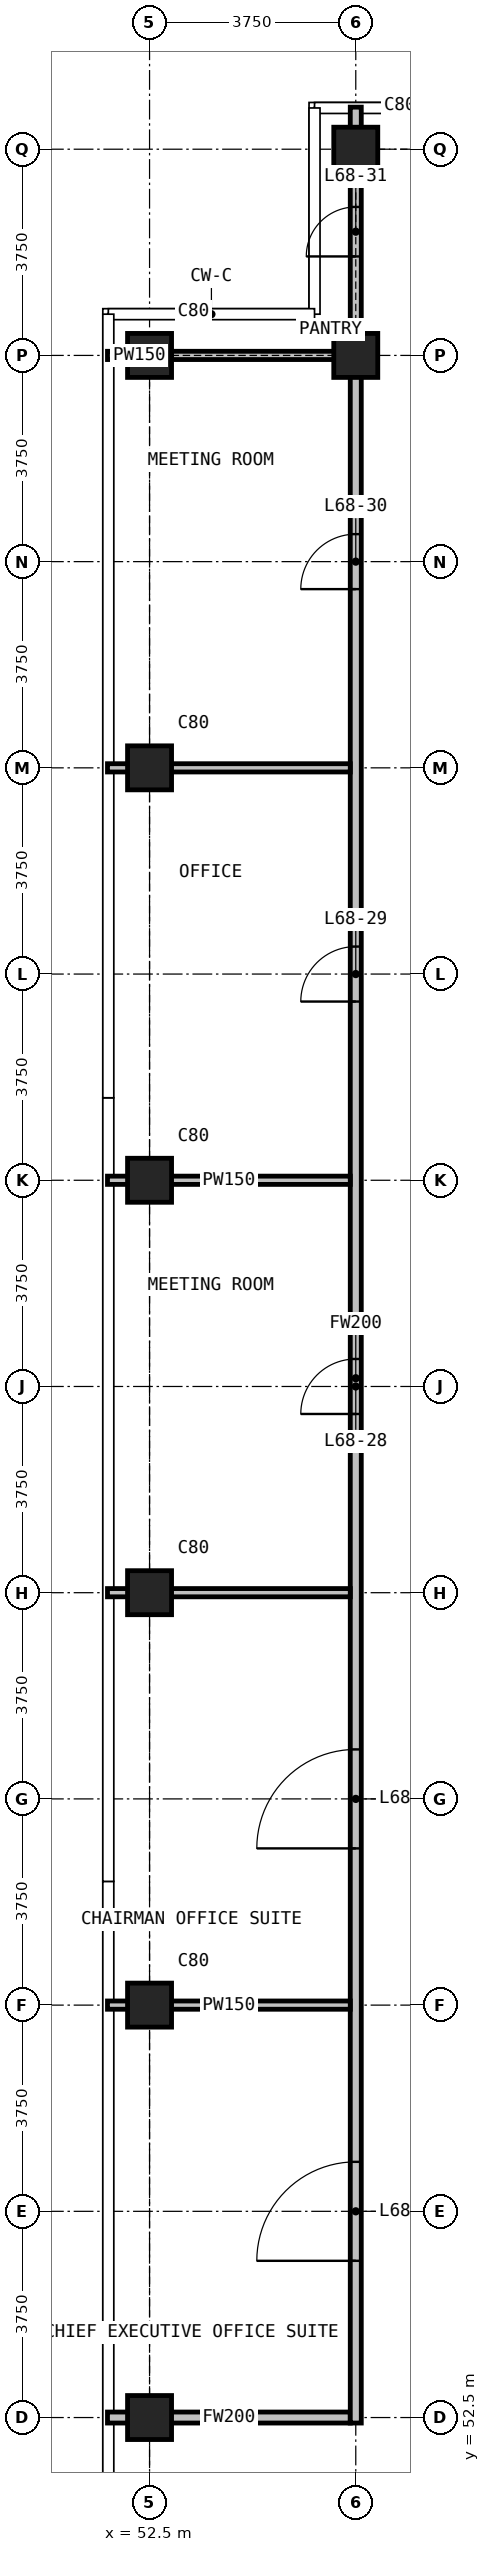
"""IFC4 building model, lengths in metres.
Left out: names, types, materials, properties, quantities, classifications, styles, units other than length and angle.
Written with IfcOpenShell. Run it as: python <this file> out.ifc"""

import sys

from ifc_helpers import new_model, si_unit, direction, frame, frame_2d, origin, origin_2d, place, context, subcontext, project, spatial, rectangle, extrude, element, fill, save


model = new_model("IFC4")
c1 = context("Model", 3, precision=1e-05, world=origin(), true_north=direction((0.0, 1.0)))
c2 = subcontext(c1, "Body", "Model", "MODEL_VIEW")
j1 = project(units=[si_unit("LENGTHUNIT", "METRE"), si_unit("PLANEANGLEUNIT", "RADIAN")], contexts=[c1])
p1 = place(None, origin())
s1 = spatial("IfcSite", under=j1, at=p1, CompositionType="ELEMENT")
p2 = place(p1, origin())
s2 = spatial("IfcBuilding", under=s1, at=p2, CompositionType="ELEMENT")
p3 = place(p2, frame((0.0, 0.0, 262.1)))
s3 = spatial("IfcBuildingStorey", under=s2, at=p3, CompositionType="ELEMENT", Elevation=262.1)
for number, where, z_axis, x_axis in (
    (1, (52.5, 52.5, 0.0), (0.0, 0.0, 1.0), (1.0, 0.0, 0.0)),
    (2, (52.5, 60.0, 0.0), (0.0, 0.0, 1.0), (1.0, 0.0, 0.0)),
    (3, (52.5, 67.5, 0.0), (0.0, 0.0, 1.0), (1.0, 0.0, 0.0)),
    (4, (52.5, 75.0, 0.0), (0.0, 0.0, 1.0), (1.0, 0.0, 0.0)),
    (5, (52.5, 82.5, 0.0), (0.0, 0.0, 1.0), (1.0, 0.0, 0.0)),
    (6, (52.5, 90.0, 0.0), (0.0, 0.0, 1.0), (1.0, 0.0, 0.0)),
    (7, (56.25, 90.0, 0.0), (0.0, 0.0, 1.0), (1.0, 0.0, 0.0)),
    (8, (56.25, 93.75, 0.0), (0.0, 0.0, 1.0), (1.0, 0.0, 0.0)),
):
    element("IfcColumn", number, at=place(p3, frame(where, z_axis=z_axis, x_axis=x_axis)), inside=s3, PredefinedType="COLUMN", context=c2, shape_type="SweptSolid", body=[
        extrude(rectangle(XDim=0.8, YDim=0.8, at=origin_2d()), origin(), (0.0, 0.0, 1.0), 3.6),
    ])
p4 = place(p3, frame((51.735, 52.5, 0.0), z_axis=(0.0, 0.0, 1.0), x_axis=(1.0, 0.0, 0.0)))
e9 = element("IfcWall", 9, at=p4, inside=s3, PredefinedType="PARTITIONING", context=c2, shape_type="SweptSolid", body=[
    extrude(rectangle(XDim=4.415, YDim=0.2, at=frame_2d((2.208, 0.0))), origin(), (0.0, 0.0, 1.0), 3.3),
])
p5 = place(p3, frame((56.25, 52.4, 0.0), z_axis=(0.0, 0.0, 1.0), x_axis=(0.0, 1.0, 0.0)))
e10 = element("IfcWall", 10, at=p5, inside=s3, PredefinedType="PARTITIONING", context=c2, shape_type="SweptSolid", body=[
    extrude(rectangle(XDim=38.0, YDim=0.2, at=frame_2d((19.0, 0.0))), origin(), (0.0, 0.0, 1.0), 3.3),
])
p6 = place(p5, frame((2.95, 0.0, 0.0)))
e11 = element("IfcOpeningElement", 11, at=p6, cuts=e10, PredefinedType="OPENING", context=c2, shape_type="SweptSolid", body=[
    extrude(rectangle(XDim=1.8, YDim=2.2, at=frame_2d((0.9, 1.1))), frame((0.0, 0.11, 0.0), z_axis=(0.0, -1.0, 0.0), x_axis=(1.0, 0.0, 0.0)), (0.0, 0.0, 1.0), 0.22),
])
p7 = place(p5, frame((10.45, 0.0, 0.0)))
e12 = element("IfcOpeningElement", 12, at=p7, cuts=e10, PredefinedType="OPENING", context=c2, shape_type="SweptSolid", body=[
    extrude(rectangle(XDim=1.8, YDim=2.2, at=frame_2d((0.9, 1.1))), frame((0.0, 0.11, 0.0), z_axis=(0.0, -1.0, 0.0), x_axis=(1.0, 0.0, 0.0)), (0.0, 0.0, 1.0), 0.22),
])
p8 = place(p5, frame((18.35, 0.0, 0.0)))
e13 = element("IfcOpeningElement", 13, at=p8, cuts=e10, PredefinedType="OPENING", context=c2, shape_type="SweptSolid", body=[
    extrude(rectangle(XDim=1.0, YDim=2.2, at=frame_2d((0.5, 1.1))), frame((0.0, 0.11, 0.0), z_axis=(0.0, -1.0, 0.0), x_axis=(1.0, 0.0, 0.0)), (0.0, 0.0, 1.0), 0.22),
])
p9 = place(p5, frame((25.85, 0.0, 0.0)))
e14 = element("IfcOpeningElement", 14, at=p9, cuts=e10, PredefinedType="OPENING", context=c2, shape_type="SweptSolid", body=[
    extrude(rectangle(XDim=1.0, YDim=2.2, at=frame_2d((0.5, 1.1))), frame((0.0, 0.11, 0.0), z_axis=(0.0, -1.0, 0.0), x_axis=(1.0, 0.0, 0.0)), (0.0, 0.0, 1.0), 0.22),
])
p10 = place(p5, frame((33.35, 0.0, 0.0)))
e15 = element("IfcOpeningElement", 15, at=p10, cuts=e10, PredefinedType="OPENING", context=c2, shape_type="SweptSolid", body=[
    extrude(rectangle(XDim=1.0, YDim=2.2, at=frame_2d((0.5, 1.1))), frame((0.0, 0.11, 0.0), z_axis=(0.0, -1.0, 0.0), x_axis=(1.0, 0.0, 0.0)), (0.0, 0.0, 1.0), 0.22),
])
p11 = place(p3, frame((56.25, 90.4, 0.0), z_axis=(0.0, 0.0, 1.0), x_axis=(0.0, 1.0, 0.0)))
e16 = element("IfcWall", 16, at=p11, inside=s3, PredefinedType="PARTITIONING", context=c2, shape_type="SweptSolid", body=[
    extrude(rectangle(XDim=2.95, YDim=0.2, at=frame_2d((1.475, 0.0))), origin(), (0.0, 0.0, 1.0), 2.5),
])
p12 = place(p11, frame((1.4, 0.0, 0.0)))
e17 = element("IfcOpeningElement", 17, at=p12, cuts=e16, PredefinedType="OPENING", context=c2, shape_type="SweptSolid", body=[
    extrude(rectangle(XDim=0.9, YDim=2.2, at=frame_2d((0.45, 1.1))), frame((0.0, 0.11, 0.0), z_axis=(0.0, -1.0, 0.0), x_axis=(1.0, 0.0, 0.0)), (0.0, 0.0, 1.0), 0.22),
])
p13 = place(p3, frame((56.25, 93.35, 0.0), z_axis=(0.0, 0.0, 1.0), x_axis=(0.0, 1.0, 0.0)))
e18 = element("IfcWall", 18, at=p13, inside=s3, PredefinedType="PARTITIONING", context=c2, shape_type="SweptSolid", body=[
    extrude(rectangle(XDim=1.165, YDim=0.2, at=frame_2d((0.583, 0.0))), origin(), (0.0, 0.0, 1.0), 3.3),
])
for number, where, z_axis, x_axis in (
    (19, (51.735, 60.0, 0.0), (0.0, 0.0, 1.0), (1.0, 0.0, 0.0)),
    (20, (51.735, 67.5, 0.0), (0.0, 0.0, 1.0), (1.0, 0.0, 0.0)),
    (21, (51.735, 75.0, 0.0), (0.0, 0.0, 1.0), (1.0, 0.0, 0.0)),
    (22, (51.735, 82.5, 0.0), (0.0, 0.0, 1.0), (1.0, 0.0, 0.0)),
):
    element("IfcWall", number, at=place(p3, frame(where, z_axis=z_axis, x_axis=x_axis)), inside=s3, PredefinedType="PARTITIONING", context=c2, shape_type="SweptSolid", body=[
        extrude(rectangle(XDim=4.415, YDim=0.15, at=frame_2d((2.208, 0.0))), origin(), (0.0, 0.0, 1.0), 3.3),
    ])
p14 = place(p3, frame((51.735, 90.0, 0.0), z_axis=(0.0, 0.0, 1.0), x_axis=(1.0, 0.0, 0.0)))
e23 = element("IfcWall", 23, at=p14, inside=s3, PredefinedType="PARTITIONING", context=c2, shape_type="SweptSolid", body=[
    extrude(rectangle(XDim=1.164, YDim=0.15, at=frame_2d((0.582, 0.0))), origin(), (0.0, 0.0, 1.0), 3.3),
])
p15 = place(p3, frame((52.899, 90.0, 0.0), z_axis=(0.0, 0.0, 1.0), x_axis=(1.0, 0.0, 0.0)))
e24 = element("IfcWall", 24, at=p15, inside=s3, PredefinedType="PARTITIONING", context=c2, shape_type="SweptSolid", body=[
    extrude(rectangle(XDim=3.251, YDim=0.15, at=frame_2d((1.625, 0.0))), origin(), (0.0, 0.0, 1.0), 2.5),
])
p16 = place(p6, origin())
e25 = element("IfcDoor", 25, at=p16, inside=s3, OperationType="DOUBLE_DOOR_SINGLE_SWING", PredefinedType="DOOR", context=c2, shape_type="SweptSolid", body=[
    extrude(rectangle(XDim=1.8, YDim=2.2, at=frame_2d((0.9, 1.1))), frame((0.0, 0.025, 0.0), z_axis=(0.0, -1.0, 0.0), x_axis=(1.0, 0.0, 0.0)), (0.0, 0.0, 1.0), 0.05),
])
fill(e11, e25)
p17 = place(p7, origin())
e26 = element("IfcDoor", 26, at=p17, inside=s3, OperationType="DOUBLE_DOOR_SINGLE_SWING", PredefinedType="DOOR", context=c2, shape_type="SweptSolid", body=[
    extrude(rectangle(XDim=1.8, YDim=2.2, at=frame_2d((0.9, 1.1))), frame((0.0, 0.025, 0.0), z_axis=(0.0, -1.0, 0.0), x_axis=(1.0, 0.0, 0.0)), (0.0, 0.0, 1.0), 0.05),
])
fill(e12, e26)
p18 = place(p8, origin())
e27 = element("IfcDoor", 27, at=p18, inside=s3, OperationType="SINGLE_SWING_LEFT", PredefinedType="DOOR", context=c2, shape_type="SweptSolid", body=[
    extrude(rectangle(XDim=1.0, YDim=2.2, at=frame_2d((0.5, 1.1))), frame((0.0, 0.025, 0.0), z_axis=(0.0, -1.0, 0.0), x_axis=(1.0, 0.0, 0.0)), (0.0, 0.0, 1.0), 0.05),
])
fill(e13, e27)
p19 = place(p9, origin())
e28 = element("IfcDoor", 28, at=p19, inside=s3, OperationType="SINGLE_SWING_RIGHT", PredefinedType="DOOR", context=c2, shape_type="SweptSolid", body=[
    extrude(rectangle(XDim=1.0, YDim=2.2, at=frame_2d((0.5, 1.1))), frame((0.0, 0.025, 0.0), z_axis=(0.0, -1.0, 0.0), x_axis=(1.0, 0.0, 0.0)), (0.0, 0.0, 1.0), 0.05),
])
fill(e14, e28)
p20 = place(p10, origin())
e29 = element("IfcDoor", 29, at=p20, inside=s3, OperationType="SINGLE_SWING_LEFT", PredefinedType="DOOR", context=c2, shape_type="SweptSolid", body=[
    extrude(rectangle(XDim=1.0, YDim=2.2, at=frame_2d((0.5, 1.1))), frame((0.0, 0.025, 0.0), z_axis=(0.0, -1.0, 0.0), x_axis=(1.0, 0.0, 0.0)), (0.0, 0.0, 1.0), 0.05),
])
fill(e15, e29)
p21 = place(p12, origin())
e30 = element("IfcDoor", 30, at=p21, inside=s3, OperationType="SINGLE_SWING_LEFT", PredefinedType="DOOR", context=c2, shape_type="SweptSolid", body=[
    extrude(rectangle(XDim=0.9, YDim=2.2, at=frame_2d((0.45, 1.1))), frame((0.0, 0.025, 0.0), z_axis=(0.0, -1.0, 0.0), x_axis=(1.0, 0.0, 0.0)), (0.0, 0.0, 1.0), 0.05),
])
fill(e17, e30)
save(model, sys.argv[1])
